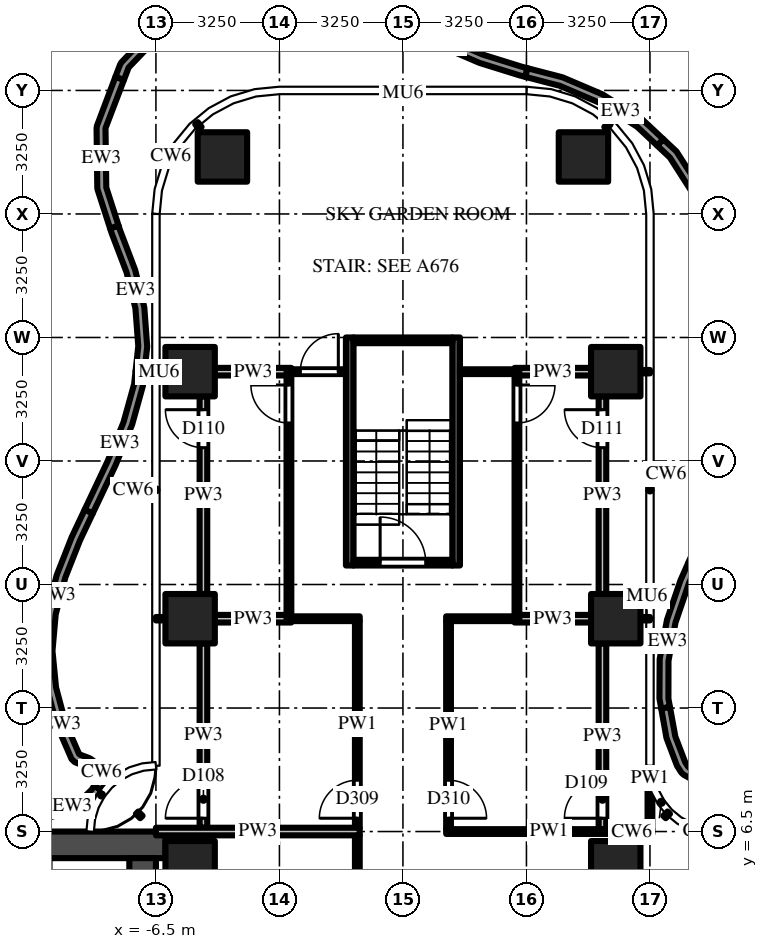
"""IFC4 building model, lengths in metres.
Left out: names, types, materials, properties, quantities, classifications, styles, units other than length and angle.
Written with IfcOpenShell. Run it as: python <this file> out.ifc"""

import sys

from ifc_helpers import new_model, si_unit, direction, frame, frame_2d, origin, origin_2d, place, context, subcontext, project, spatial, polyline, rectangle, outline, extrude, source, transform, mapped, element, fill, save


model = new_model("IFC4")
c1 = context("Model", 3, precision=1e-05, world=origin(), true_north=direction((0.0, 1.0)))
c2 = subcontext(c1, "Body", "Model", "MODEL_VIEW")
j1 = project(units=[si_unit("LENGTHUNIT", "METRE"), si_unit("PLANEANGLEUNIT", "RADIAN")], contexts=[c1])
p1 = place(None, origin())
s1 = spatial("IfcSite", under=j1, at=p1, CompositionType="ELEMENT")
p2 = place(p1, origin())
s2 = spatial("IfcBuilding", under=s1, at=p2, CompositionType="ELEMENT")
p3 = place(p2, frame((0.0, 0.0, 92.5)))
s3 = spatial("IfcBuildingStorey", under=s2, at=p3, CompositionType="ELEMENT", Elevation=92.5)
m1 = source(origin(), c2, "Body", "SweptSolid", [
    extrude(rectangle(XDim=1.3, YDim=1.3, at=origin_2d()), origin(), (0.0, 0.0, 1.0), 5.0),
])
for number, where, z_axis, x_axis in (
    (1, (-5.6, 12.1, 0.0), (0.0, 0.0, 1.0), (1.0, 0.0, 0.0)),
    (2, (-5.6, 18.6, 0.0), (0.0, 0.0, 1.0), (1.0, 0.0, 0.0)),
    (3, (-4.75, 24.25, 0.0), (0.0, 0.0, 1.0), (1.0, 0.0, 0.0)),
    (4, (5.6, 12.1, 0.0), (0.0, 0.0, 1.0), (1.0, 0.0, 0.0)),
    (5, (5.6, 18.6, 0.0), (0.0, 0.0, 1.0), (1.0, 0.0, 0.0)),
    (6, (4.75, 24.25, 0.0), (0.0, 0.0, 1.0), (1.0, 0.0, 0.0)),
    (7, (5.6, 5.6, 0.0), (0.0, 0.0, 1.0), (1.0, 0.0, 0.0)),
    (8, (-5.6, 5.6, 0.0), (0.0, 0.0, 1.0), (1.0, 0.0, 0.0)),
):
    element("IfcColumn", number, at=place(p3, frame(where, z_axis=z_axis, x_axis=x_axis)), inside=s3, PredefinedType="COLUMN", context=c2, shape_type="MappedRepresentation", body=[
        mapped(m1, transform((0.0, 0.0, 0.0))),
    ])
m2 = source(origin(), c2, "Body", "SweptSolid", [
    extrude(rectangle(XDim=16.5, YDim=0.7, at=frame_2d((8.25, 0.0))), origin(), (0.0, 0.0, 1.0), 4.75),
])
p4 = place(p3, frame((-6.25, 6.15, 0.0), z_axis=(0.0, 0.0, 1.0), x_axis=(-1.0, 0.0, 0.0)))
e9 = element("IfcWall", 9, at=p4, inside=s3, PredefinedType="SHEAR", context=c2, shape_type="MappedRepresentation", body=[
    mapped(m2, transform((0.0, 0.0, 0.0))),
])
m3 = source(origin(), c2, "Body", "SweptSolid", [
    extrude(rectangle(XDim=9.05, YDim=0.7, at=frame_2d((4.525, 0.0))), origin(), (0.0, 0.0, 1.0), 4.75),
])
p5 = place(p3, frame((-6.85, 5.8, 0.0), z_axis=(0.0, 0.0, 1.0), x_axis=(0.0, -1.0, 0.0)))
e10 = element("IfcWall", 10, at=p5, inside=s3, PredefinedType="SHEAR", context=c2, shape_type="MappedRepresentation", body=[
    mapped(m3, transform((0.0, 0.0, 0.0))),
])
m4 = source(origin(), c2, "Body", "SweptSolid", [
    extrude(rectangle(XDim=1.8, YDim=2.1, at=frame_2d((0.9, 1.05))), frame((0.0, 0.36, 0.0), z_axis=(0.0, -1.0, 0.0), x_axis=(1.0, 0.0, 0.0)), (0.0, 0.0, 1.0), 0.72),
])
p6 = place(p5, frame((3.15, 0.0, 0.0)))
e11 = element("IfcOpeningElement", 11, at=p6, cuts=e10, PredefinedType="OPENING", context=c2, shape_type="MappedRepresentation", body=[
    mapped(m4, transform((0.0, 0.0, 0.0))),
])
m5 = source(origin(), c2, "Body", "SweptSolid", [
    extrude(rectangle(XDim=6.0, YDim=0.2, at=frame_2d((3.0, 0.0))), origin(), (0.0, 0.0, 1.0), 4.75),
])
for number, where, z_axis, x_axis in (
    (12, (-1.4, 13.5, 0.0), (0.0, 0.0, 1.0), (0.0, 1.0, 0.0)),
    (13, (1.4, 13.5, 0.0), (0.0, 0.0, 1.0), (0.0, 1.0, 0.0)),
):
    element("IfcWall", number, at=place(p3, frame(where, z_axis=z_axis, x_axis=x_axis)), inside=s3, PredefinedType="SHEAR", context=c2, shape_type="MappedRepresentation", body=[
        mapped(m5, transform((0.0, 0.0, 0.0))),
    ])
m6 = source(origin(), c2, "Body", "SweptSolid", [
    extrude(rectangle(XDim=2.6, YDim=0.15, at=frame_2d((1.3, 0.0))), origin(), (0.0, 0.0, 1.0), 4.75),
])
p7 = place(p3, frame((-1.3, 13.575, 0.0), z_axis=(0.0, 0.0, 1.0), x_axis=(1.0, 0.0, 0.0)))
e14 = element("IfcWall", 14, at=p7, inside=s3, PredefinedType="SHEAR", context=c2, shape_type="MappedRepresentation", body=[
    mapped(m6, transform((0.0, 0.0, 0.0))),
])
m7 = source(origin(), c2, "Body", "SweptSolid", [
    extrude(rectangle(XDim=1.2, YDim=2.1, at=frame_2d((0.6, 1.05))), frame((0.0, 0.085, 0.0), z_axis=(0.0, -1.0, 0.0), x_axis=(1.0, 0.0, 0.0)), (0.0, 0.0, 1.0), 0.17),
])
p8 = place(p7, frame((0.7, 0.0, 0.0)))
e15 = element("IfcOpeningElement", 15, at=p8, cuts=e14, PredefinedType="OPENING", context=c2, shape_type="MappedRepresentation", body=[
    mapped(m7, transform((0.0, 0.0, 0.0))),
])
p9 = place(p3, frame((-1.3, 19.425, 0.0), z_axis=(0.0, 0.0, 1.0), x_axis=(1.0, 0.0, 0.0)))
e16 = element("IfcWall", 16, at=p9, inside=s3, PredefinedType="SHEAR", context=c2, shape_type="MappedRepresentation", body=[
    mapped(m6, transform((0.0, 0.0, 0.0))),
])
p10 = place(p3, origin())
e17 = element("IfcWall", 17, at=p10, inside=s3, PredefinedType="PARAPET", context=c2, shape_type="SweptSolid", body=[
    extrude(outline(polyline([(-11.6, 7.079), (-11.461, 7.044), (-10.47, 6.964), (-9.47, 7.068), (-8.543, 7.324), (-8.396, 7.406), (-8.194, 7.598), (-8.121, 7.709), (-7.927, 7.579), (-8.021, 7.439), (-8.229, 7.237), (-8.422, 7.119), (-8.466, 7.101), (-9.436, 6.835), (-10.478, 6.729), (-11.509, 6.814), (-11.658, 6.852), (-11.6, 7.079)])), origin(), (0.0, 0.0, 1.0), 1.1),
])
e18 = element("IfcWall", 18, at=p10, inside=s3, PredefinedType="PARAPET", context=c2, shape_type="SweptSolid", body=[
    extrude(outline(polyline([(-8.121, 7.709), (-8.111, 7.725), (-8.101, 7.755), (-8.089, 7.877), (-8.095, 7.912), (-8.169, 8.073), (-8.189, 8.098), (-8.354, 8.22), (-8.632, 8.323), (-8.72, 8.407), (-9.106, 9.296), (-9.358, 10.244), (-9.439, 11.061), (-9.206, 11.084), (-9.129, 10.296), (-8.881, 9.365), (-8.523, 8.544), (-8.505, 8.527), (-8.256, 8.434), (-8.208, 8.408), (-8.024, 8.268), (-7.967, 8.197), (-7.868, 7.982), (-7.852, 7.885), (-7.87, 7.704), (-7.898, 7.622), (-7.927, 7.579), (-8.121, 7.709)])), origin(), (0.0, 0.0, 1.0), 1.1),
])
e19 = element("IfcWall", 19, at=p10, inside=s3, PredefinedType="PARAPET", context=c2, shape_type="SweptSolid", body=[
    extrude(outline(polyline([(-9.439, 11.061), (-9.457, 11.239), (-9.371, 12.241), (-9.111, 13.247), (-8.713, 14.255), (-8.374, 14.972), (-8.162, 14.872), (-8.496, 14.165), (-8.884, 13.186), (-9.138, 12.21), (-9.222, 11.251), (-9.206, 11.084), (-9.439, 11.061)])), origin(), (0.0, 0.0, 1.0), 1.1),
])
e20 = element("IfcWall", 20, at=p10, inside=s3, PredefinedType="PARAPET", context=c2, shape_type="SweptSolid", body=[
    extrude(outline(polyline([(-8.374, 14.972), (-7.77, 16.248), (-7.353, 17.27), (-7.073, 18.273), (-7.037, 18.61), (-6.804, 18.584), (-6.844, 18.22), (-7.125, 17.208), (-7.556, 16.151), (-8.162, 14.872), (-8.374, 14.972)])), origin(), (0.0, 0.0, 1.0), 1.1),
])
e21 = element("IfcWall", 21, at=p10, inside=s3, PredefinedType="PARAPET", context=c2, shape_type="SweptSolid", body=[
    extrude(outline(polyline([(-7.037, 18.61), (-6.964, 19.272), (-7.039, 20.264), (-7.272, 21.211), (-7.665, 22.242), (-7.706, 22.371), (-7.483, 22.443), (-7.442, 22.317), (-7.045, 21.275), (-6.806, 20.292), (-6.729, 19.258), (-6.804, 18.584), (-7.037, 18.61)])), origin(), (0.0, 0.0, 1.0), 1.1),
])
e22 = element("IfcWall", 22, at=p10, inside=s3, PredefinedType="PARAPET", context=c2, shape_type="SweptSolid", body=[
    extrude(outline(polyline([(-7.706, 22.371), (-8.035, 23.392), (-8.043, 23.438), (-8.062, 25.001), (-8.053, 25.066), (-7.564, 26.362), (-7.342, 26.277), (-7.822, 25.021), (-7.827, 24.993), (-7.806, 23.447), (-7.483, 22.443), (-7.706, 22.371)])), origin(), (0.0, 0.0, 1.0), 1.1),
])
e23 = element("IfcWall", 23, at=p10, inside=s3, PredefinedType="PARAPET", context=c2, shape_type="SweptSolid", body=[
    extrude(outline(polyline([(-7.564, 26.362), (-7.445, 26.677), (-7.41, 26.738), (-6.136, 28.071), (-6.075, 28.109), (-4.375, 28.818), (-4.285, 28.601), (-5.979, 27.893), (-7.218, 26.603), (-7.342, 26.277), (-7.564, 26.362)])), origin(), (0.0, 0.0, 1.0), 1.1),
])
e24 = element("IfcWall", 24, at=p10, inside=s3, PredefinedType="PARAPET", context=c2, shape_type="SweptSolid", body=[
    extrude(outline(polyline([(-0.356, 28.059), (1.113, 27.367), (2.097, 26.944), (3.129, 26.624), (3.279, 26.585), (3.22, 26.357), (3.059, 26.399), (2.01, 26.726), (1.015, 27.154), (-0.456, 27.846), (-0.356, 28.059)])), origin(), (0.0, 0.0, 1.0), 1.1),
])
e25 = element("IfcWall", 25, at=p10, inside=s3, PredefinedType="PARAPET", context=c2, shape_type="SweptSolid", body=[
    extrude(outline(polyline([(3.279, 26.585), (4.2, 26.345), (5.256, 25.896), (6.298, 25.237), (6.852, 24.718), (6.692, 24.548), (6.163, 25.044), (5.16, 25.68), (4.132, 26.12), (3.22, 26.357), (3.279, 26.585)])), origin(), (0.0, 0.0, 1.0), 1.1),
])
e26 = element("IfcWall", 26, at=p10, inside=s3, PredefinedType="PARAPET", context=c2, shape_type="SweptSolid", body=[
    extrude(outline(polyline([(6.852, 24.718), (7.197, 24.395), (7.979, 23.177), (8.849, 21.214), (8.634, 21.119), (7.768, 23.073), (7.025, 24.234), (6.692, 24.548), (6.852, 24.718)])), origin(), (0.0, 0.0, 1.0), 1.1),
])
e27 = element("IfcWall", 27, at=p10, inside=s3, PredefinedType="PARAPET", context=c2, shape_type="SweptSolid", body=[
    extrude(outline(polyline([(7.728, 13.488), (7.527, 13.037), (7.171, 11.995), (6.988, 10.991), (6.986, 9.996), (7.026, 9.776), (6.797, 9.736), (6.75, 9.999), (6.756, 11.036), (6.949, 12.073), (7.304, 13.113), (7.514, 13.583), (7.728, 13.488)])), origin(), (0.0, 0.0, 1.0), 1.1),
])
e28 = element("IfcWall", 28, at=p10, inside=s3, PredefinedType="PARAPET", context=c2, shape_type="SweptSolid", body=[
    extrude(outline(polyline([(7.026, 9.776), (7.168, 9.001), (7.426, 8.327), (7.504, 8.206), (7.526, 8.185), (7.637, 8.12), (7.715, 8.093), (7.922, 8.092), (7.963, 8.106), (8.108, 8.22), (8.256, 8.427), (8.657, 8.835), (8.726, 8.875), (9.033, 8.984), (9.114, 8.76), (8.795, 8.644), (8.431, 8.271), (8.307, 8.089), (8.267, 8.046), (8.077, 7.897), (7.963, 7.857), (7.721, 7.854), (7.661, 7.863), (7.566, 7.894), (7.384, 7.997), (7.323, 8.054), (7.211, 8.23), (6.935, 8.961), (6.797, 9.736), (7.026, 9.776)])), origin(), (0.0, 0.0, 1.0), 1.1),
])
m8 = source(origin(), c2, "Body", "SweptSolid", [
    extrude(rectangle(XDim=4.85, YDim=0.2, at=frame_2d((2.425, 0.0))), origin(), (0.0, 0.0, 1.0), 4.046),
])
p11 = place(p3, frame((-5.25, 6.6, 0.0), z_axis=(0.0, 0.0, 1.0), x_axis=(0.0, 1.0, 0.0)))
e29 = element("IfcWall", 29, at=p11, inside=s3, PredefinedType="PARTITIONING", context=c2, shape_type="MappedRepresentation", body=[
    mapped(m8, transform((0.0, 0.0, 0.0))),
])
m9 = source(origin(), c2, "Body", "SweptSolid", [
    extrude(rectangle(XDim=1.0, YDim=2.1, at=frame_2d((0.5, 1.05))), frame((0.0, 0.11, 0.0), z_axis=(0.0, -1.0, 0.0), x_axis=(1.0, 0.0, 0.0)), (0.0, 0.0, 1.0), 0.22),
])
p12 = place(p11, frame((0.25, 0.0, 0.0)))
e30 = element("IfcOpeningElement", 30, at=p12, cuts=e29, PredefinedType="OPENING", context=c2, shape_type="MappedRepresentation", body=[
    mapped(m9, transform((0.0, 0.0, 0.0))),
])
m10 = source(origin(), c2, "Body", "SweptSolid", [
    extrude(rectangle(XDim=5.2, YDim=0.2, at=frame_2d((2.6, 0.0))), origin(), (0.0, 0.0, 1.0), 4.323),
])
p13 = place(p3, frame((-5.25, 12.75, 0.0), z_axis=(0.0, 0.0, 1.0), x_axis=(0.0, 1.0, 0.0)))
e31 = element("IfcWall", 31, at=p13, inside=s3, PredefinedType="PARTITIONING", context=c2, shape_type="MappedRepresentation", body=[
    mapped(m10, transform((0.0, 0.0, 0.0))),
])
p14 = place(p13, frame((3.85, 0.0, 0.0)))
e32 = element("IfcOpeningElement", 32, at=p14, cuts=e31, PredefinedType="OPENING", context=c2, shape_type="MappedRepresentation", body=[
    mapped(m9, transform((0.0, 0.0, 0.0))),
])
m11 = source(origin(), c2, "Body", "SweptSolid", [
    extrude(rectangle(XDim=6.3, YDim=0.125, at=frame_2d((3.15, 0.0))), origin(), (0.0, 0.0, 1.0), 3.968),
])
p15 = place(p3, frame((-3.0, 12.2, 0.0), z_axis=(0.0, 0.0, 1.0), x_axis=(0.0, 1.0, 0.0)))
e33 = element("IfcWall", 33, at=p15, inside=s3, PredefinedType="PARTITIONING", context=c2, shape_type="MappedRepresentation", body=[
    mapped(m11, transform((0.0, 0.0, 0.0))),
])
m12 = source(origin(), c2, "Body", "SweptSolid", [
    extrude(rectangle(XDim=1.0, YDim=2.1, at=frame_2d((0.5, 1.05))), frame((0.0, 0.073, 0.0), z_axis=(0.0, -1.0, 0.0), x_axis=(1.0, 0.0, 0.0)), (0.0, 0.0, 1.0), 0.145),
])
p16 = place(p15, frame((5.05, 0.0, 0.0)))
e34 = element("IfcOpeningElement", 34, at=p16, cuts=e33, PredefinedType="OPENING", context=c2, shape_type="MappedRepresentation", body=[
    mapped(m12, transform((0.0, 0.0, 0.0))),
])
p17 = place(p3, frame((-1.2, 6.4, 0.0), z_axis=(0.0, 0.0, 1.0), x_axis=(0.0, -1.0, 0.0)))
e35 = element("IfcWall", 35, at=p17, inside=s3, PredefinedType="PARTITIONING", context=c2, shape_type="SweptSolid", body=[
    extrude(rectangle(XDim=3.087, YDim=0.125, at=frame_2d((1.544, 0.0))), origin(), (0.0, 0.0, 1.0), 3.968),
])
p18 = place(p3, frame((-1.2, 6.6, 0.0), z_axis=(0.0, 0.0, 1.0), x_axis=(0.0, 1.0, 0.0)))
e36 = element("IfcWall", 36, at=p18, inside=s3, PredefinedType="PARTITIONING", context=c2, shape_type="SweptSolid", body=[
    extrude(rectangle(XDim=5.438, YDim=0.125, at=frame_2d((2.719, 0.0))), origin(), (0.0, 0.0, 1.0), 3.968),
])
p19 = place(p18, frame((0.25, 0.0, 0.0)))
e37 = element("IfcOpeningElement", 37, at=p19, cuts=e36, PredefinedType="OPENING", context=c2, shape_type="MappedRepresentation", body=[
    mapped(m12, transform((0.0, 0.0, 0.0))),
])
m13 = source(origin(), c2, "Body", "SweptSolid", [
    extrude(rectangle(XDim=5.475, YDim=0.125, at=frame_2d((2.738, 0.0))), origin(), (0.0, 0.0, 1.0), 3.968),
])
p20 = place(p3, frame((1.2, 12.038, 0.0), z_axis=(0.0, 0.0, 1.0), x_axis=(0.0, -1.0, 0.0)))
e38 = element("IfcWall", 38, at=p20, inside=s3, PredefinedType="PARTITIONING", context=c2, shape_type="MappedRepresentation", body=[
    mapped(m13, transform((0.0, 0.0, 0.0))),
])
p21 = place(p20, frame((4.188, 0.0, 0.0)))
e39 = element("IfcOpeningElement", 39, at=p21, cuts=e38, PredefinedType="OPENING", context=c2, shape_type="MappedRepresentation", body=[
    mapped(m12, transform((0.0, 0.0, 0.0))),
])
p22 = place(p3, frame((3.0, 18.5, 0.0), z_axis=(0.0, 0.0, 1.0), x_axis=(0.0, -1.0, 0.0)))
e40 = element("IfcWall", 40, at=p22, inside=s3, PredefinedType="PARTITIONING", context=c2, shape_type="MappedRepresentation", body=[
    mapped(m11, transform((0.0, 0.0, 0.0))),
])
p23 = place(p22, frame((0.25, 0.0, 0.0)))
e41 = element("IfcOpeningElement", 41, at=p23, cuts=e40, PredefinedType="OPENING", context=c2, shape_type="MappedRepresentation", body=[
    mapped(m12, transform((0.0, 0.0, 0.0))),
])
m14 = source(origin(), c2, "Body", "SweptSolid", [
    extrude(rectangle(XDim=4.887, YDim=0.2, at=frame_2d((2.444, 0.0))), origin(), (0.0, 0.0, 1.0), 4.046),
])
p24 = place(p3, frame((5.25, 6.562, 0.0), z_axis=(0.0, 0.0, 1.0), x_axis=(0.0, 1.0, 0.0)))
e42 = element("IfcWall", 42, at=p24, inside=s3, PredefinedType="PARTITIONING", context=c2, shape_type="MappedRepresentation", body=[
    mapped(m14, transform((0.0, 0.0, 0.0))),
])
p25 = place(p24, frame((0.288, 0.0, 0.0)))
e43 = element("IfcOpeningElement", 43, at=p25, cuts=e42, PredefinedType="OPENING", context=c2, shape_type="MappedRepresentation", body=[
    mapped(m9, transform((0.0, 0.0, 0.0))),
])
p26 = place(p3, frame((5.25, 12.75, 0.0), z_axis=(0.0, 0.0, 1.0), x_axis=(0.0, 1.0, 0.0)))
e44 = element("IfcWall", 44, at=p26, inside=s3, PredefinedType="PARTITIONING", context=c2, shape_type="MappedRepresentation", body=[
    mapped(m10, transform((0.0, 0.0, 0.0))),
])
p27 = place(p26, frame((3.85, 0.0, 0.0)))
e45 = element("IfcOpeningElement", 45, at=p27, cuts=e44, PredefinedType="OPENING", context=c2, shape_type="MappedRepresentation", body=[
    mapped(m9, transform((0.0, 0.0, 0.0))),
])
m15 = source(origin(), c2, "Body", "SweptSolid", [
    extrude(rectangle(XDim=1.469, YDim=0.125, at=frame_2d((0.734, 0.0))), origin(), (0.0, 0.0, 1.0), 4.75),
])
p28 = place(p3, frame((6.5, 6.562, 0.0), z_axis=(0.0, 0.0, 1.0), x_axis=(0.0, 1.0, 0.0)))
e46 = element("IfcWall", 46, at=p28, inside=s3, PredefinedType="PARTITIONING", context=c2, shape_type="MappedRepresentation", body=[
    mapped(m15, transform((0.0, 0.0, 0.0))),
])
p29 = place(p3, frame((-6.5, 6.5, 0.0), z_axis=(0.0, 0.0, 1.0), x_axis=(1.0, 0.0, 0.0)))
e47 = element("IfcWall", 47, at=p29, inside=s3, PredefinedType="PARTITIONING", context=c2, shape_type="SweptSolid", body=[
    extrude(rectangle(XDim=5.363, YDim=0.2, at=frame_2d((2.681, 0.0))), origin(), (0.0, 0.0, 1.0), 4.23),
])
m16 = source(origin(), c2, "Body", "SweptSolid", [
    extrude(rectangle(XDim=5.425, YDim=0.125, at=frame_2d((2.712, 0.0))), origin(), (0.0, 0.0, 1.0), 4.23),
])
p30 = place(p3, frame((1.137, 6.5, 0.0), z_axis=(0.0, 0.0, 1.0), x_axis=(1.0, 0.0, 0.0)))
e48 = element("IfcWall", 48, at=p30, inside=s3, PredefinedType="PARTITIONING", context=c2, shape_type="MappedRepresentation", body=[
    mapped(m16, transform((0.0, 0.0, 0.0))),
])
m17 = source(origin(), c2, "Body", "SweptSolid", [
    extrude(rectangle(XDim=2.012, YDim=0.2, at=frame_2d((1.006, 0.0))), origin(), (0.0, 0.0, 1.0), 3.968),
])
for number, where, z_axis, x_axis in (
    (49, (-4.95, 12.1, 0.0), (0.0, 0.0, 1.0), (1.0, 0.0, 0.0)),
    (50, (2.938, 12.1, 0.0), (0.0, 0.0, 1.0), (1.0, 0.0, 0.0)),
):
    element("IfcWall", number, at=place(p3, frame(where, z_axis=z_axis, x_axis=x_axis)), inside=s3, PredefinedType="PARTITIONING", context=c2, shape_type="MappedRepresentation", body=[
        mapped(m17, transform((0.0, 0.0, 0.0))),
    ])
m18 = source(origin(), c2, "Body", "SweptSolid", [
    extrude(rectangle(XDim=1.925, YDim=0.125, at=frame_2d((0.962, 0.0))), origin(), (0.0, 0.0, 1.0), 3.968),
])
for number, where, z_axis, x_axis in (
    (51, (-1.137, 12.1, 0.0), (0.0, 0.0, 1.0), (-1.0, 0.0, 0.0)),
    (52, (3.062, 12.1, 0.0), (0.0, 0.0, 1.0), (-1.0, 0.0, 0.0)),
):
    element("IfcWall", number, at=place(p3, frame(where, z_axis=z_axis, x_axis=x_axis)), inside=s3, PredefinedType="PARTITIONING", context=c2, shape_type="MappedRepresentation", body=[
        mapped(m18, transform((0.0, 0.0, 0.0))),
    ])
m19 = source(origin(), c2, "Body", "SweptSolid", [
    extrude(rectangle(XDim=2.012, YDim=0.2, at=frame_2d((1.006, 0.0))), origin(), (0.0, 0.0, 1.0), 4.197),
])
for number, where, z_axis, x_axis in (
    (53, (-4.95, 18.6, 0.0), (0.0, 0.0, 1.0), (1.0, 0.0, 0.0)),
    (54, (2.938, 18.6, 0.0), (0.0, 0.0, 1.0), (1.0, 0.0, 0.0)),
):
    element("IfcWall", number, at=place(p3, frame(where, z_axis=z_axis, x_axis=x_axis)), inside=s3, PredefinedType="PARTITIONING", context=c2, shape_type="MappedRepresentation", body=[
        mapped(m19, transform((0.0, 0.0, 0.0))),
    ])
m20 = source(origin(), c2, "Body", "SweptSolid", [
    extrude(rectangle(XDim=1.562, YDim=0.125, at=frame_2d((0.781, 0.0))), origin(), (0.0, 0.0, 1.0), 4.197),
])
p31 = place(p3, frame((-3.062, 18.6, 0.0), z_axis=(0.0, 0.0, 1.0), x_axis=(1.0, 0.0, 0.0)))
e55 = element("IfcWall", 55, at=p31, inside=s3, PredefinedType="PARTITIONING", context=c2, shape_type="MappedRepresentation", body=[
    mapped(m20, transform((0.0, 0.0, 0.0))),
])
p32 = place(p31, frame((0.363, 0.0, 0.0)))
e56 = element("IfcOpeningElement", 56, at=p32, cuts=e55, PredefinedType="OPENING", context=c2, shape_type="MappedRepresentation", body=[
    mapped(m12, transform((0.0, 0.0, 0.0))),
])
p33 = place(p3, frame((1.5, 18.6, 0.0), z_axis=(0.0, 0.0, 1.0), x_axis=(1.0, 0.0, 0.0)))
e57 = element("IfcWall", 57, at=p33, inside=s3, PredefinedType="PARTITIONING", context=c2, shape_type="MappedRepresentation", body=[
    mapped(m20, transform((0.0, 0.0, 0.0))),
])
m21 = source(origin(), c2, "Body", "SweptSolid", [
    extrude(rectangle(XDim=1.2, YDim=2.1, at=frame_2d((0.6, 1.05))), frame((0.0, 0.025, 0.0), z_axis=(0.0, -1.0, 0.0), x_axis=(1.0, 0.0, 0.0)), (0.0, 0.0, 1.0), 0.05),
])
p34 = place(p8, origin())
e58 = element("IfcDoor", 58, at=p34, inside=s3, OperationType="SINGLE_SWING_LEFT", PredefinedType="DOOR", context=c2, shape_type="MappedRepresentation", body=[
    mapped(m21, transform((0.0, 0.0, 0.0))),
])
fill(e15, e58)
m22 = source(origin(), c2, "Body", "SweptSolid", [
    extrude(rectangle(XDim=1.0, YDim=2.1, at=frame_2d((0.5, 1.05))), frame((0.0, 0.025, 0.0), z_axis=(0.0, -1.0, 0.0), x_axis=(1.0, 0.0, 0.0)), (0.0, 0.0, 1.0), 0.05),
])
p35 = place(p12, origin())
e59 = element("IfcDoor", 59, at=p35, inside=s3, OperationType="SINGLE_SWING_LEFT", PredefinedType="DOOR", context=c2, shape_type="MappedRepresentation", body=[
    mapped(m22, transform((0.0, 0.0, 0.0))),
])
fill(e30, e59)
p36 = place(p19, origin())
e60 = element("IfcDoor", 60, at=p36, inside=s3, OperationType="SINGLE_SWING_LEFT", PredefinedType="DOOR", context=c2, shape_type="MappedRepresentation", body=[
    mapped(m22, transform((0.0, 0.0, 0.0))),
])
fill(e37, e60)
p37 = place(p21, origin())
e61 = element("IfcDoor", 61, at=p37, inside=s3, OperationType="SINGLE_SWING_RIGHT", PredefinedType="DOOR", context=c2, shape_type="MappedRepresentation", body=[
    mapped(m22, transform((0.0, 0.0, 0.0))),
])
fill(e39, e61)
p38 = place(p25, origin())
e62 = element("IfcDoor", 62, at=p38, inside=s3, OperationType="SINGLE_SWING_LEFT", PredefinedType="DOOR", context=c2, shape_type="MappedRepresentation", body=[
    mapped(m22, transform((0.0, 0.0, 0.0))),
])
fill(e43, e62)
p39 = place(p14, origin())
e63 = element("IfcDoor", 63, at=p39, inside=s3, OperationType="SINGLE_SWING_RIGHT", PredefinedType="DOOR", context=c2, shape_type="MappedRepresentation", body=[
    mapped(m22, transform((0.0, 0.0, 0.0))),
])
fill(e32, e63)
p40 = place(p27, origin())
e64 = element("IfcDoor", 64, at=p40, inside=s3, OperationType="SINGLE_SWING_RIGHT", PredefinedType="DOOR", context=c2, shape_type="MappedRepresentation", body=[
    mapped(m22, transform((0.0, 0.0, 0.0))),
])
fill(e45, e64)
p41 = place(p16, origin())
e65 = element("IfcDoor", 65, at=p41, inside=s3, OperationType="SINGLE_SWING_RIGHT", PredefinedType="DOOR", context=c2, shape_type="MappedRepresentation", body=[
    mapped(m22, transform((0.0, 0.0, 0.0))),
])
fill(e34, e65)
p42 = place(p23, origin())
e66 = element("IfcDoor", 66, at=p42, inside=s3, OperationType="SINGLE_SWING_LEFT", PredefinedType="DOOR", context=c2, shape_type="MappedRepresentation", body=[
    mapped(m22, transform((0.0, 0.0, 0.0))),
])
fill(e41, e66)
p43 = place(p32, origin())
e67 = element("IfcDoor", 67, at=p43, inside=s3, OperationType="SINGLE_SWING_RIGHT", PredefinedType="DOOR", context=c2, shape_type="MappedRepresentation", body=[
    mapped(m22, transform((0.0, 0.0, 0.0))),
])
fill(e56, e67)
save(model, sys.argv[1])
